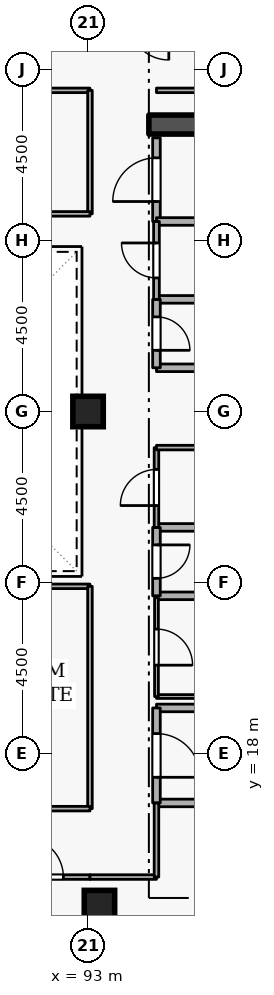
"""IFC4 building model, lengths in metres.
Left out: names, types, materials, properties, quantities, classifications, styles, units other than length and angle.
Written with IfcOpenShell. Run it as: python <this file> out.ifc"""

import sys

from ifc_helpers import new_model, si_unit, direction, frame, frame_2d, origin, origin_2d, place, context, subcontext, project, spatial, rectangle, extrude, element, fill, save


model = new_model("IFC4")
c1 = context("Model", 3, precision=1e-05, world=origin(), true_north=direction((0.0, 1.0)))
c2 = subcontext(c1, "Body", "Model", "MODEL_VIEW")
j1 = project(units=[si_unit("LENGTHUNIT", "METRE"), si_unit("PLANEANGLEUNIT", "RADIAN")], contexts=[c1])
p1 = place(None, origin())
s1 = spatial("IfcSite", under=j1, at=p1, CompositionType="ELEMENT")
p2 = place(p1, origin())
s2 = spatial("IfcBuilding", under=s1, at=p2, CompositionType="ELEMENT")
p3 = place(p2, frame((0.0, 0.0, 261.9)))
s3 = spatial("IfcBuildingStorey", under=s2, at=p3, CompositionType="ELEMENT", Elevation=261.9)
p4 = place(p3, frame((94.6, 34.55, 0.0), z_axis=(0.0, 0.0, 1.0), x_axis=(1.0, 0.0, 0.0)))
e1 = element("IfcWall", 1, at=p4, inside=s3, PredefinedType="SHEAR", context=c2, shape_type="SweptSolid", body=[
    extrude(rectangle(XDim=5.8, YDim=0.5, at=frame_2d((2.9, 0.0))), origin(), (0.0, 0.0, 1.0), 3.6),
])
for number, where, z_axis, x_axis in (
    (2, (93.3, 14.0, 0.0), (0.0, 0.0, 1.0), (1.0, 0.0, 0.0)),
    (3, (93.0, 27.0, 0.0), (0.0, 0.0, 1.0), (1.0, 0.0, 0.0)),
):
    element("IfcColumn", number, at=place(p3, frame(where, z_axis=z_axis, x_axis=x_axis)), inside=s3, PredefinedType="COLUMN", context=c2, shape_type="SweptSolid", body=[
        extrude(rectangle(XDim=0.8, YDim=0.8, at=origin_2d()), origin(), (0.0, 0.0, 1.0), 3.6),
    ])
p5 = place(p3, frame((94.8, 16.7, 0.0), z_axis=(0.0, 0.0, 1.0), x_axis=(1.0, 0.0, 0.0)))
e4 = element("IfcWall", 4, at=p5, inside=s3, PredefinedType="STANDARD", context=c2, shape_type="SweptSolid", body=[
    extrude(rectangle(XDim=5.7, YDim=0.2, at=frame_2d((2.85, 0.0))), origin(), (0.0, 0.0, 1.0), 3.34),
])
p6 = place(p3, frame((97.1, 19.2, 0.0), z_axis=(0.0, 0.0, 1.0), x_axis=(-1.0, 0.0, 0.0)))
e5 = element("IfcWall", 5, at=p6, inside=s3, PredefinedType="STANDARD", context=c2, shape_type="SweptSolid", body=[
    extrude(rectangle(XDim=2.3, YDim=0.2, at=frame_2d((1.15, 0.0))), origin(), (0.0, 0.0, 1.0), 2.545),
])
p7 = place(p3, frame((94.8, 19.2, 0.0), z_axis=(0.0, 0.0, 1.0), x_axis=(0.0, -1.0, 0.0)))
e6 = element("IfcWall", 6, at=p7, inside=s3, PredefinedType="STANDARD", context=c2, shape_type="SweptSolid", body=[
    extrude(rectangle(XDim=2.5, YDim=0.2, at=frame_2d((1.25, 0.0))), origin(), (0.0, 0.0, 1.0), 3.34),
])
p8 = place(p7, frame((0.675, 0.0, 0.0)))
e7 = element("IfcOpeningElement", 7, at=p8, cuts=e6, PredefinedType="OPENING", context=c2, shape_type="SweptSolid", body=[
    extrude(rectangle(XDim=1.15, YDim=2.1, at=frame_2d((0.575, 1.05))), frame((0.0, 0.11, 0.0), z_axis=(0.0, -1.0, 0.0), x_axis=(1.0, 0.0, 0.0)), (0.0, 0.0, 1.0), 0.22),
])
for number, where, z_axis, x_axis in (
    (8, (94.8, 28.15, 0.0), (0.0, 0.0, 1.0), (1.0, 0.0, 0.0)),
    (9, (96.85, 29.95, 0.0), (0.0, 0.0, 1.0), (-1.0, 0.0, 0.0)),
):
    element("IfcWall", number, at=place(p3, frame(where, z_axis=z_axis, x_axis=x_axis)), inside=s3, PredefinedType="STANDARD", context=c2, shape_type="SweptSolid", body=[
        extrude(rectangle(XDim=2.05, YDim=0.2, at=frame_2d((1.025, 0.0))), origin(), (0.0, 0.0, 1.0), 3.34),
    ])
p9 = place(p3, frame((94.8, 29.95, 0.0), z_axis=(0.0, 0.0, 1.0), x_axis=(0.0, -1.0, 0.0)))
e10 = element("IfcWall", 10, at=p9, inside=s3, PredefinedType="STANDARD", context=c2, shape_type="SweptSolid", body=[
    extrude(rectangle(XDim=1.8, YDim=0.2, at=frame_2d((0.9, 0.0))), origin(), (0.0, 0.0, 1.0), 3.34),
])
p10 = place(p9, frame((0.46, 0.0, 0.0)))
e11 = element("IfcOpeningElement", 11, at=p10, cuts=e10, PredefinedType="OPENING", context=c2, shape_type="SweptSolid", body=[
    extrude(rectangle(XDim=0.88, YDim=2.04, at=frame_2d((0.44, 1.02))), frame((0.0, 0.11, 0.0), z_axis=(0.0, -1.0, 0.0), x_axis=(1.0, 0.0, 0.0)), (0.0, 0.0, 1.0), 0.22),
])
for number, where, z_axis, x_axis in (
    (12, (94.8, 22.15, 0.0), (0.0, 0.0, 1.0), (1.0, 0.0, 0.0)),
    (13, (96.85, 23.95, 0.0), (0.0, 0.0, 1.0), (-1.0, 0.0, 0.0)),
):
    element("IfcWall", number, at=place(p3, frame(where, z_axis=z_axis, x_axis=x_axis)), inside=s3, PredefinedType="STANDARD", context=c2, shape_type="SweptSolid", body=[
        extrude(rectangle(XDim=2.05, YDim=0.2, at=frame_2d((1.025, 0.0))), origin(), (0.0, 0.0, 1.0), 3.34),
    ])
p11 = place(p3, frame((94.8, 23.95, 0.0), z_axis=(0.0, 0.0, 1.0), x_axis=(0.0, -1.0, 0.0)))
e14 = element("IfcWall", 14, at=p11, inside=s3, PredefinedType="STANDARD", context=c2, shape_type="SweptSolid", body=[
    extrude(rectangle(XDim=1.8, YDim=0.2, at=frame_2d((0.9, 0.0))), origin(), (0.0, 0.0, 1.0), 3.34),
])
p12 = place(p11, frame((0.46, 0.0, 0.0)))
e15 = element("IfcOpeningElement", 15, at=p12, cuts=e14, PredefinedType="OPENING", context=c2, shape_type="SweptSolid", body=[
    extrude(rectangle(XDim=0.88, YDim=2.04, at=frame_2d((0.44, 1.02))), frame((0.0, 0.11, 0.0), z_axis=(0.0, -1.0, 0.0), x_axis=(1.0, 0.0, 0.0)), (0.0, 0.0, 1.0), 0.22),
])
p13 = place(p3, frame((94.8, 32.0, 0.0), z_axis=(0.0, 0.0, 1.0), x_axis=(0.0, 1.0, 0.0)))
e16 = element("IfcWall", 16, at=p13, inside=s3, PredefinedType="STANDARD", context=c2, shape_type="SweptSolid", body=[
    extrude(rectangle(XDim=2.2, YDim=0.2, at=frame_2d((1.1, 0.0))), origin(), (0.0, 0.0, 1.0), 3.34),
])
p14 = place(p13, frame((0.525, 0.0, 0.0)))
e17 = element("IfcOpeningElement", 17, at=p14, cuts=e16, PredefinedType="OPENING", context=c2, shape_type="SweptSolid", body=[
    extrude(rectangle(XDim=1.15, YDim=2.1, at=frame_2d((0.575, 1.05))), frame((0.0, 0.11, 0.0), z_axis=(0.0, -1.0, 0.0), x_axis=(1.0, 0.0, 0.0)), (0.0, 0.0, 1.0), 0.22),
])
p15 = place(p3, frame((96.85, 32.0, 0.0), z_axis=(0.0, 0.0, 1.0), x_axis=(-1.0, 0.0, 0.0)))
e18 = element("IfcWall", 18, at=p15, inside=s3, PredefinedType="STANDARD", context=c2, shape_type="SweptSolid", body=[
    extrude(rectangle(XDim=2.05, YDim=0.2, at=frame_2d((1.025, 0.0))), origin(), (0.0, 0.0, 1.0), 3.34),
])
p16 = place(p3, frame((94.8, 19.5, 0.0), z_axis=(0.0, 0.0, 1.0), x_axis=(1.0, 0.0, 0.0)))
e19 = element("IfcWall", 19, at=p16, inside=s3, PredefinedType="PARTITIONING", context=c2, shape_type="SweptSolid", body=[
    extrude(rectangle(XDim=2.05, YDim=0.1, at=frame_2d((1.025, 0.0))), origin(), (0.0, 0.0, 1.0), 2.545),
])
p17 = place(p3, frame((94.8, 22.1, 0.0), z_axis=(0.0, 0.0, 1.0), x_axis=(0.0, -1.0, 0.0)))
e20 = element("IfcWall", 20, at=p17, inside=s3, PredefinedType="PARTITIONING", context=c2, shape_type="SweptSolid", body=[
    extrude(rectangle(XDim=2.6, YDim=0.1, at=frame_2d((1.3, 0.0))), origin(), (0.0, 0.0, 1.0), 3.34),
])
p18 = place(p17, frame((0.825, 0.0, 0.0)))
e21 = element("IfcOpeningElement", 21, at=p18, cuts=e20, PredefinedType="OPENING", context=c2, shape_type="SweptSolid", body=[
    extrude(rectangle(XDim=0.95, YDim=2.1, at=frame_2d((0.475, 1.05))), frame((0.0, 0.06, 0.0), z_axis=(0.0, -1.0, 0.0), x_axis=(1.0, 0.0, 0.0)), (0.0, 0.0, 1.0), 0.12),
])
p19 = place(p3, frame((94.8, 23.95, 0.0), z_axis=(0.0, 0.0, 1.0), x_axis=(0.0, 1.0, 0.0)))
e22 = element("IfcWall", 22, at=p19, inside=s3, PredefinedType="PARTITIONING", context=c2, shape_type="SweptSolid", body=[
    extrude(rectangle(XDim=2.1, YDim=0.12, at=frame_2d((1.05, 0.0))), origin(), (0.0, 0.0, 1.0), 3.34),
])
p20 = place(p19, frame((0.575, 0.0, 0.0)))
e23 = element("IfcOpeningElement", 23, at=p20, cuts=e22, PredefinedType="OPENING", context=c2, shape_type="SweptSolid", body=[
    extrude(rectangle(XDim=0.95, YDim=2.1, at=frame_2d((0.475, 1.05))), frame((0.0, 0.07, 0.0), z_axis=(0.0, -1.0, 0.0), x_axis=(1.0, 0.0, 0.0)), (0.0, 0.0, 1.0), 0.14),
])
p21 = place(p3, frame((94.8, 26.05, 0.0), z_axis=(0.0, 0.0, 1.0), x_axis=(1.0, 0.0, 0.0)))
e24 = element("IfcWall", 24, at=p21, inside=s3, PredefinedType="PARTITIONING", context=c2, shape_type="SweptSolid", body=[
    extrude(rectangle(XDim=2.05, YDim=0.12, at=frame_2d((1.025, 0.0))), origin(), (0.0, 0.0, 1.0), 3.34),
])
p22 = place(p3, frame((94.8, 29.95, 0.0), z_axis=(0.0, 0.0, 1.0), x_axis=(0.0, 1.0, 0.0)))
e25 = element("IfcWall", 25, at=p22, inside=s3, PredefinedType="PARTITIONING", context=c2, shape_type="SweptSolid", body=[
    extrude(rectangle(XDim=2.05, YDim=0.15, at=frame_2d((1.025, 0.0))), origin(), (0.0, 0.0, 1.0), 3.34),
])
p23 = place(p22, frame((0.565, 0.0, 0.0)))
e26 = element("IfcOpeningElement", 26, at=p23, cuts=e25, PredefinedType="OPENING", context=c2, shape_type="SweptSolid", body=[
    extrude(rectangle(XDim=0.92, YDim=2.08, at=frame_2d((0.46, 1.04))), frame((0.0, 0.085, 0.0), z_axis=(0.0, -1.0, 0.0), x_axis=(1.0, 0.0, 0.0)), (0.0, 0.0, 1.0), 0.17),
])
p24 = place(p3, frame((94.8, 35.45, 0.0), z_axis=(0.0, 0.0, 1.0), x_axis=(1.0, 0.0, 0.0)))
e27 = element("IfcWall", 27, at=p24, inside=s3, PredefinedType="PARTITIONING", context=c2, shape_type="SweptSolid", body=[
    extrude(rectangle(XDim=5.9, YDim=0.12, at=frame_2d((2.95, 0.0))), origin(), (0.0, 0.0, 1.0), 3.34),
])
p25 = place(p3, frame((90.6, 14.75, 0.0), z_axis=(0.0, 0.0, 1.0), x_axis=(1.0, 0.0, 0.0)))
e28 = element("IfcWall", 28, at=p25, inside=s3, PredefinedType="PARTITIONING", context=c2, shape_type="SweptSolid", body=[
    extrude(rectangle(XDim=2.45, YDim=0.12, at=frame_2d((1.225, 0.0))), origin(), (0.0, 0.0, 1.0), 3.34),
])
p26 = place(p25, frame((0.7, 0.0, 0.0)))
e29 = element("IfcOpeningElement", 29, at=p26, cuts=e28, PredefinedType="OPENING", context=c2, shape_type="SweptSolid", body=[
    extrude(rectangle(XDim=1.05, YDim=2.1, at=frame_2d((0.525, 1.05))), frame((0.0, 0.07, 0.0), z_axis=(0.0, -1.0, 0.0), x_axis=(1.0, 0.0, 0.0)), (0.0, 0.0, 1.0), 0.14),
])
p27 = place(p3, frame((93.05, 14.75, 0.0), z_axis=(0.0, 0.0, 1.0), x_axis=(1.0, 0.0, 0.0)))
e30 = element("IfcWall", 30, at=p27, inside=s3, PredefinedType="PARTITIONING", context=c2, shape_type="SweptSolid", body=[
    extrude(rectangle(XDim=1.75, YDim=0.12, at=frame_2d((0.875, 0.0))), origin(), (0.0, 0.0, 1.0), 3.34),
])
p28 = place(p3, frame((94.8, 14.75, 0.0), z_axis=(0.0, 0.0, 1.0), x_axis=(0.0, 1.0, 0.0)))
e31 = element("IfcWall", 31, at=p28, inside=s3, PredefinedType="PARTITIONING", context=c2, shape_type="SweptSolid", body=[
    extrude(rectangle(XDim=1.95, YDim=0.12, at=frame_2d((0.975, 0.0))), origin(), (0.0, 0.0, 1.0), 3.34),
])
p29 = place(p3, frame((83.95, 22.4, 0.0), z_axis=(0.0, 0.0, 1.0), x_axis=(1.0, 0.0, 0.0)))
e32 = element("IfcWall", 32, at=p29, inside=s3, PredefinedType="PARTITIONING", context=c2, shape_type="SweptSolid", body=[
    extrude(rectangle(XDim=9.1, YDim=0.12, at=frame_2d((4.55, 0.0))), origin(), (0.0, 0.0, 1.0), 3.34),
])
p30 = place(p3, frame((93.05, 22.4, 0.0), z_axis=(0.0, 0.0, 1.0), x_axis=(0.0, -1.0, 0.0)))
e33 = element("IfcWall", 33, at=p30, inside=s3, PredefinedType="PARTITIONING", context=c2, shape_type="SweptSolid", body=[
    extrude(rectangle(XDim=5.85, YDim=0.12, at=frame_2d((2.925, 0.0))), origin(), (0.0, 0.0, 1.0), 3.34),
])
p31 = place(p3, frame((93.05, 16.55, 0.0), z_axis=(0.0, 0.0, 1.0), x_axis=(-1.0, 0.0, 0.0)))
e34 = element("IfcWall", 34, at=p31, inside=s3, PredefinedType="PARTITIONING", context=c2, shape_type="SweptSolid", body=[
    extrude(rectangle(XDim=9.1, YDim=0.12, at=frame_2d((4.55, 0.0))), origin(), (0.0, 0.0, 1.0), 3.34),
])
p32 = place(p31, frame((4.075, 0.0, 0.0)))
e35 = element("IfcOpeningElement", 35, at=p32, cuts=e34, PredefinedType="OPENING", context=c2, shape_type="SweptSolid", body=[
    extrude(rectangle(XDim=0.95, YDim=2.1, at=frame_2d((0.475, 1.05))), frame((0.0, 0.07, 0.0), z_axis=(0.0, -1.0, 0.0), x_axis=(1.0, 0.0, 0.0)), (0.0, 0.0, 1.0), 0.14),
])
p33 = place(p3, frame((83.95, 35.45, 0.0), z_axis=(0.0, 0.0, 1.0), x_axis=(1.0, 0.0, 0.0)))
e36 = element("IfcWall", 36, at=p33, inside=s3, PredefinedType="PARTITIONING", context=c2, shape_type="SweptSolid", body=[
    extrude(rectangle(XDim=9.1, YDim=0.12, at=frame_2d((4.55, 0.0))), origin(), (0.0, 0.0, 1.0), 3.34),
])
p34 = place(p33, frame((4.075, 0.0, 0.0)))
e37 = element("IfcOpeningElement", 37, at=p34, cuts=e36, PredefinedType="OPENING", context=c2, shape_type="SweptSolid", body=[
    extrude(rectangle(XDim=0.95, YDim=2.1, at=frame_2d((0.475, 1.05))), frame((0.0, 0.07, 0.0), z_axis=(0.0, -1.0, 0.0), x_axis=(1.0, 0.0, 0.0)), (0.0, 0.0, 1.0), 0.14),
])
p35 = place(p3, frame((93.05, 35.45, 0.0), z_axis=(0.0, 0.0, 1.0), x_axis=(0.0, -1.0, 0.0)))
e38 = element("IfcWall", 38, at=p35, inside=s3, PredefinedType="PARTITIONING", context=c2, shape_type="SweptSolid", body=[
    extrude(rectangle(XDim=3.25, YDim=0.12, at=frame_2d((1.625, 0.0))), origin(), (0.0, 0.0, 1.0), 3.34),
])
p36 = place(p3, frame((93.05, 32.2, 0.0), z_axis=(0.0, 0.0, 1.0), x_axis=(-1.0, 0.0, 0.0)))
e39 = element("IfcWall", 39, at=p36, inside=s3, PredefinedType="PARTITIONING", context=c2, shape_type="SweptSolid", body=[
    extrude(rectangle(XDim=9.1, YDim=0.12, at=frame_2d((4.55, 0.0))), origin(), (0.0, 0.0, 1.0), 3.34),
])
p37 = place(p8, origin())
e40 = element("IfcDoor", 40, at=p37, inside=s3, OperationType="SINGLE_SWING_RIGHT", PredefinedType="DOOR", context=c2, shape_type="SweptSolid", body=[
    extrude(rectangle(XDim=1.15, YDim=2.1, at=frame_2d((0.575, 1.05))), frame((0.0, 0.025, 0.0), z_axis=(0.0, -1.0, 0.0), x_axis=(1.0, 0.0, 0.0)), (0.0, 0.0, 1.0), 0.05),
])
fill(e7, e40)
p38 = place(p10, origin())
e41 = element("IfcDoor", 41, at=p38, inside=s3, OperationType="SINGLE_SWING_RIGHT", PredefinedType="DOOR", context=c2, shape_type="SweptSolid", body=[
    extrude(rectangle(XDim=0.88, YDim=2.04, at=frame_2d((0.44, 1.02))), frame((0.0, 0.025, 0.0), z_axis=(0.0, -1.0, 0.0), x_axis=(1.0, 0.0, 0.0)), (0.0, 0.0, 1.0), 0.05),
])
fill(e11, e41)
p39 = place(p12, origin())
e42 = element("IfcDoor", 42, at=p39, inside=s3, OperationType="SINGLE_SWING_LEFT", PredefinedType="DOOR", context=c2, shape_type="SweptSolid", body=[
    extrude(rectangle(XDim=0.88, YDim=2.04, at=frame_2d((0.44, 1.02))), frame((0.0, 0.025, 0.0), z_axis=(0.0, -1.0, 0.0), x_axis=(1.0, 0.0, 0.0)), (0.0, 0.0, 1.0), 0.05),
])
fill(e15, e42)
p40 = place(p18, origin())
e43 = element("IfcDoor", 43, at=p40, inside=s3, OperationType="SINGLE_SWING_RIGHT", PredefinedType="DOOR", context=c2, shape_type="SweptSolid", body=[
    extrude(rectangle(XDim=0.95, YDim=2.1, at=frame_2d((0.475, 1.05))), frame((0.0, 0.025, 0.0), z_axis=(0.0, -1.0, 0.0), x_axis=(1.0, 0.0, 0.0)), (0.0, 0.0, 1.0), 0.05),
])
fill(e21, e43)
p41 = place(p20, origin())
e44 = element("IfcDoor", 44, at=p41, inside=s3, OperationType="SINGLE_SWING_LEFT", PredefinedType="DOOR", context=c2, shape_type="SweptSolid", body=[
    extrude(rectangle(XDim=0.95, YDim=2.1, at=frame_2d((0.475, 1.05))), frame((0.0, 0.025, 0.0), z_axis=(0.0, -1.0, 0.0), x_axis=(1.0, 0.0, 0.0)), (0.0, 0.0, 1.0), 0.05),
])
fill(e23, e44)
p42 = place(p23, origin())
e45 = element("IfcDoor", 45, at=p42, inside=s3, OperationType="SINGLE_SWING_RIGHT", PredefinedType="DOOR", context=c2, shape_type="SweptSolid", body=[
    extrude(rectangle(XDim=0.92, YDim=2.08, at=frame_2d((0.46, 1.04))), frame((0.0, 0.025, 0.0), z_axis=(0.0, -1.0, 0.0), x_axis=(1.0, 0.0, 0.0)), (0.0, 0.0, 1.0), 0.05),
])
fill(e26, e45)
p43 = place(p14, origin())
e46 = element("IfcDoor", 46, at=p43, inside=s3, OperationType="SINGLE_SWING_LEFT", PredefinedType="DOOR", context=c2, shape_type="SweptSolid", body=[
    extrude(rectangle(XDim=1.15, YDim=2.1, at=frame_2d((0.575, 1.05))), frame((0.0, 0.025, 0.0), z_axis=(0.0, -1.0, 0.0), x_axis=(1.0, 0.0, 0.0)), (0.0, 0.0, 1.0), 0.05),
])
fill(e17, e46)
p44 = place(p26, origin())
e47 = element("IfcDoor", 47, at=p44, inside=s3, OperationType="SINGLE_SWING_LEFT", PredefinedType="DOOR", context=c2, shape_type="SweptSolid", body=[
    extrude(rectangle(XDim=1.05, YDim=2.1, at=frame_2d((0.525, 1.05))), frame((0.0, 0.025, 0.0), z_axis=(0.0, -1.0, 0.0), x_axis=(1.0, 0.0, 0.0)), (0.0, 0.0, 1.0), 0.05),
])
fill(e29, e47)
save(model, sys.argv[1])
